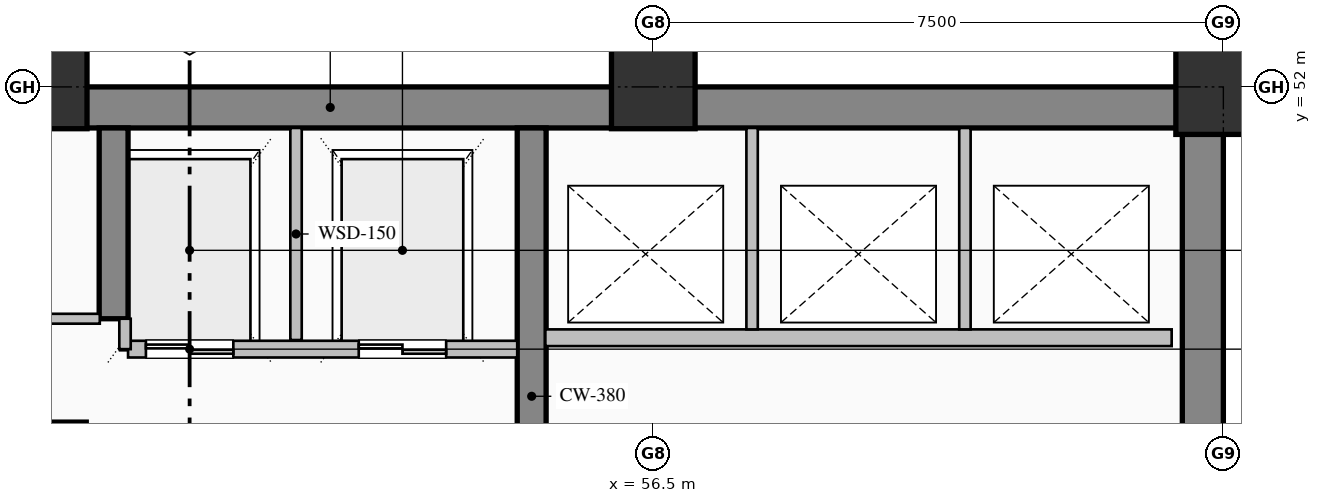
"""IFC4 building model, lengths in metres.
Left out: names, types, materials, properties, quantities, classifications, styles, units other than length and angle.
Written with IfcOpenShell. Run it as: python <this file> out.ifc"""

import sys

from ifc_helpers import new_model, si_unit, direction, frame, frame_2d, origin, origin_2d, place, context, subcontext, project, spatial, rectangle, hollow_rectangle, extrude, element, fill, save


model = new_model("IFC4")
c1 = context("Model", 3, precision=1e-05, world=origin(), true_north=direction((0.0, 1.0)))
c2 = subcontext(c1, "Body", "Model", "MODEL_VIEW")
j1 = project(units=[si_unit("LENGTHUNIT", "METRE"), si_unit("PLANEANGLEUNIT", "RADIAN")], contexts=[c1])
p1 = place(None, origin())
s1 = spatial("IfcSite", under=j1, at=p1, CompositionType="ELEMENT")
p2 = place(p1, origin())
s2 = spatial("IfcBuilding", under=s1, at=p2, CompositionType="ELEMENT")
p3 = place(p2, frame((0.0, 0.0, 68.2)))
s3 = spatial("IfcBuildingStorey", under=s2, at=p3, CompositionType="ELEMENT", Elevation=68.2)
p4 = place(p3, frame((40.5, 51.73, 0.0), z_axis=(0.0, 0.0, 1.0), x_axis=(1.0, 0.0, 0.0)))
e1 = element("IfcWall", 1, at=p4, inside=s3, PredefinedType="SHEAR", context=c2, shape_type="SweptSolid", body=[
    extrude(rectangle(XDim=23.5, YDim=0.54, at=frame_2d((11.75, 0.0))), origin(), (0.0, 0.0, 1.0), 3.75),
])
p5 = place(p3, frame((63.73, 36.32, 0.0), z_axis=(0.0, 0.0, 1.0), x_axis=(0.0, 1.0, 0.0)))
e2 = element("IfcWall", 2, at=p5, inside=s3, PredefinedType="SHEAR", context=c2, shape_type="SweptSolid", body=[
    extrude(rectangle(XDim=15.14, YDim=0.54, at=frame_2d((7.57, 0.0))), origin(), (0.0, 0.0, 1.0), 3.75),
])
p6 = place(p3, frame((49.4, 48.95, 0.0), z_axis=(0.0, 0.0, 1.0), x_axis=(0.0, 1.0, 0.0)))
e3 = element("IfcWall", 3, at=p6, inside=s3, PredefinedType="SHEAR", context=c2, shape_type="SweptSolid", body=[
    extrude(rectangle(XDim=2.51, YDim=0.38, at=frame_2d((1.255, 0.0))), origin(), (0.0, 0.0, 1.0), 3.75),
])
p7 = place(p3, frame((54.9, 44.4, 0.0), z_axis=(0.0, 0.0, 1.0), x_axis=(0.0, 1.0, 0.0)))
e4 = element("IfcWall", 4, at=p7, inside=s3, PredefinedType="SHEAR", context=c2, shape_type="SweptSolid", body=[
    extrude(rectangle(XDim=7.06, YDim=0.38, at=frame_2d((3.53, 0.0))), origin(), (0.0, 0.0, 1.0), 3.75),
])
for number, where, z_axis, x_axis in (
    (5, (48.5, 52.0, 0.0), (0.0, 0.0, 1.0), (1.0, 0.0, 0.0)),
    (6, (56.5, 52.0, 0.0), (0.0, 0.0, 1.0), (1.0, 0.0, 0.0)),
):
    element("IfcColumn", number, at=place(p3, frame(where, z_axis=z_axis, x_axis=x_axis)), inside=s3, PredefinedType="COLUMN", context=c2, shape_type="SweptSolid", body=[
        extrude(hollow_rectangle(XDim=1.1, YDim=1.1, WallThickness=0.04, at=origin_2d()), origin(), (0.0, 0.0, 1.0), 4.0),
    ])
p8 = place(p3, frame((64.0, 52.0, 0.0), z_axis=(0.0, 0.0, 1.0), x_axis=(1.0, 0.0, 0.0)))
e7 = element("IfcColumn", 7, at=p8, inside=s3, PredefinedType="COLUMN", context=c2, shape_type="SweptSolid", body=[
    extrude(hollow_rectangle(XDim=1.25, YDim=1.25, WallThickness=0.045, at=origin_2d()), origin(), (0.0, 0.0, 1.0), 4.0),
])
p9 = place(p3, frame((40.96, 47.47, 0.0), z_axis=(0.0, 0.0, 1.0), x_axis=(1.0, 0.0, 0.0)))
e8 = element("IfcWall", 8, at=p9, inside=s3, PredefinedType="SOLIDWALL", context=c2, shape_type="SweptSolid", body=[
    extrude(rectangle(XDim=8.08, YDim=0.24, at=frame_2d((4.04, 0.0))), origin(), (0.0, 0.0, 1.0), 4.0),
])
p10 = place(p3, frame((54.71, 48.55, 0.0), z_axis=(0.0, 0.0, 1.0), x_axis=(-1.0, 0.0, 0.0)))
e9 = element("IfcWall", 9, at=p10, inside=s3, PredefinedType="PARTITIONING", context=c2, shape_type="SweptSolid", body=[
    extrude(rectangle(XDim=5.12, YDim=0.22, at=frame_2d((2.56, 0.0))), origin(), (0.0, 0.0, 1.0), 3.75),
])
p11 = place(p10, frame((3.735, 0.0, 0.0)))
e10 = element("IfcOpeningElement", 10, at=p11, cuts=e9, PredefinedType="OPENING", context=c2, shape_type="SweptSolid", body=[
    extrude(rectangle(XDim=1.15, YDim=2.2, at=frame_2d((0.575, 1.1))), frame((0.0, 0.12, 0.0), z_axis=(0.0, -1.0, 0.0), x_axis=(1.0, 0.0, 0.0)), (0.0, 0.0, 1.0), 0.24),
])
p12 = place(p10, frame((0.935, 0.0, 0.0)))
e11 = element("IfcOpeningElement", 11, at=p12, cuts=e9, PredefinedType="OPENING", context=c2, shape_type="SweptSolid", body=[
    extrude(rectangle(XDim=1.15, YDim=2.2, at=frame_2d((0.575, 1.1))), frame((0.0, 0.12, 0.0), z_axis=(0.0, -1.0, 0.0), x_axis=(1.0, 0.0, 0.0)), (0.0, 0.0, 1.0), 0.24),
])
p13 = place(p3, frame((51.8, 48.67, 0.0), z_axis=(0.0, 0.0, 1.0), x_axis=(0.0, 1.0, 0.0)))
e12 = element("IfcWall", 12, at=p13, inside=s3, PredefinedType="PARTITIONING", context=c2, shape_type="SweptSolid", body=[
    extrude(rectangle(XDim=2.79, YDim=0.15, at=frame_2d((1.395, 0.0))), origin(), (0.0, 0.0, 1.0), 3.75),
])
p14 = place(p3, frame((49.55, 48.55, 0.0), z_axis=(0.0, 0.0, 1.0), x_axis=(0.0, 1.0, 0.0)))
e13 = element("IfcWall", 13, at=p14, inside=s3, PredefinedType="PARTITIONING", context=c2, shape_type="SweptSolid", body=[
    extrude(rectangle(XDim=0.4, YDim=0.15, at=frame_2d((0.2, 0.0))), origin(), (0.0, 0.0, 1.0), 3.75),
])
p15 = place(p3, frame((63.32, 48.7, 0.0), z_axis=(0.0, 0.0, 1.0), x_axis=(-1.0, 0.0, 0.0)))
e14 = element("IfcWall", 14, at=p15, inside=s3, PredefinedType="PARTITIONING", context=c2, shape_type="SweptSolid", body=[
    extrude(rectangle(XDim=8.24, YDim=0.22, at=frame_2d((4.12, 0.0))), origin(), (0.0, 0.0, 1.0), 3.75),
])
for number, where, z_axis, x_axis in (
    (15, (57.8, 48.81, 0.0), (0.0, 0.0, 1.0), (0.0, 1.0, 0.0)),
    (16, (60.6, 48.81, 0.0), (0.0, 0.0, 1.0), (0.0, 1.0, 0.0)),
):
    element("IfcWall", number, at=place(p3, frame(where, z_axis=z_axis, x_axis=x_axis)), inside=s3, PredefinedType="PARTITIONING", context=c2, shape_type="SweptSolid", body=[
        extrude(rectangle(XDim=2.65, YDim=0.15, at=frame_2d((1.325, 0.0))), origin(), (0.0, 0.0, 1.0), 3.75),
    ])
p16 = place(p3, frame((45.2, 48.95, 0.0), z_axis=(0.0, 0.0, 1.0), x_axis=(1.0, 0.0, 0.0)))
e17 = element("IfcWall", 17, at=p16, inside=s3, PredefinedType="PARTITIONING", context=c2, shape_type="SweptSolid", body=[
    extrude(rectangle(XDim=4.018, YDim=0.13, at=frame_2d((2.009, 0.0))), origin(), (0.0, 0.0, 1.0), 3.75),
])
p17 = place(p16, frame((1.549, 0.0, 0.0)))
e18 = element("IfcOpeningElement", 18, at=p17, cuts=e17, PredefinedType="OPENING", context=c2, shape_type="SweptSolid", body=[
    extrude(rectangle(XDim=0.92, YDim=2.15, at=frame_2d((0.46, 1.075))), frame((0.0, 0.075, 0.0), z_axis=(0.0, -1.0, 0.0), x_axis=(1.0, 0.0, 0.0)), (0.0, 0.0, 1.0), 0.15),
])
p18 = place(p11, origin())
e19 = element("IfcDoor", 19, at=p18, inside=s3, OperationType="DOUBLE_DOOR_SLIDING", PredefinedType="DOOR", context=c2, shape_type="SweptSolid", body=[
    extrude(rectangle(XDim=1.15, YDim=2.2, at=frame_2d((0.575, 1.1))), frame((0.0, 0.025, 0.0), z_axis=(0.0, -1.0, 0.0), x_axis=(1.0, 0.0, 0.0)), (0.0, 0.0, 1.0), 0.05),
])
fill(e10, e19)
p19 = place(p12, origin())
e20 = element("IfcDoor", 20, at=p19, inside=s3, OperationType="DOUBLE_DOOR_SLIDING", PredefinedType="DOOR", context=c2, shape_type="SweptSolid", body=[
    extrude(rectangle(XDim=1.15, YDim=2.2, at=frame_2d((0.575, 1.1))), frame((0.0, 0.025, 0.0), z_axis=(0.0, -1.0, 0.0), x_axis=(1.0, 0.0, 0.0)), (0.0, 0.0, 1.0), 0.05),
])
fill(e11, e20)
save(model, sys.argv[1])
